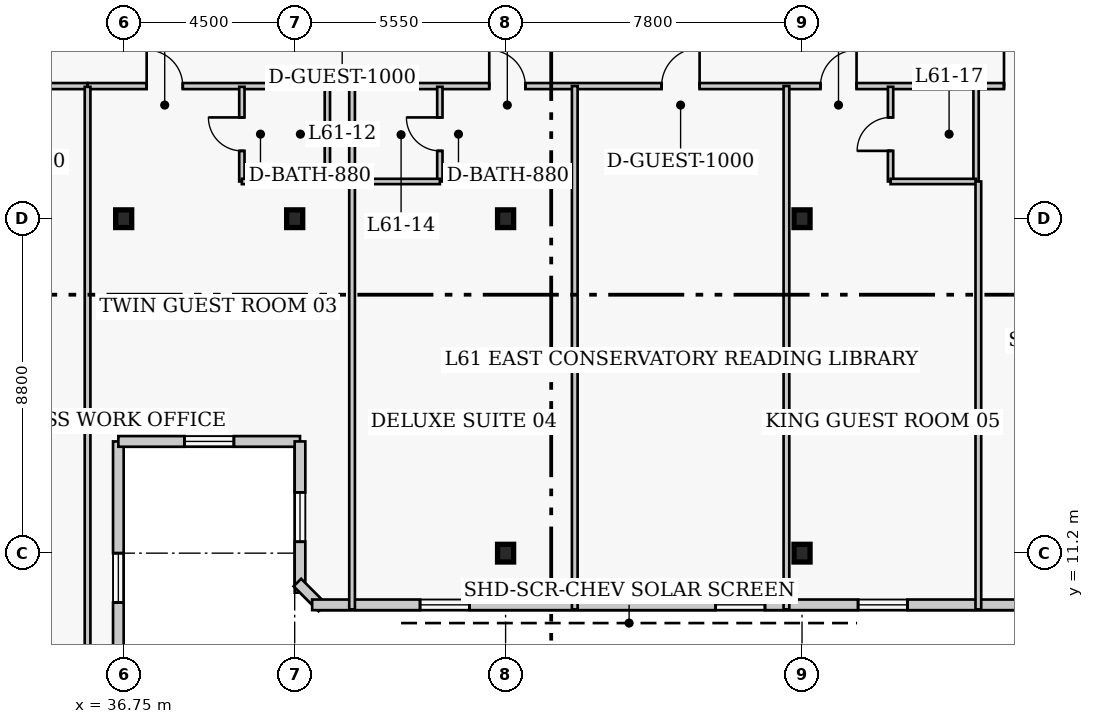
"""IFC4 building model, lengths in metres.
Left out: names, types, materials, properties, quantities, classifications, styles, units other than length and angle.
Written with IfcOpenShell. Run it as: python <this file> out.ifc"""

import sys

from ifc_helpers import new_model, si_unit, direction, frame, frame_2d, origin, origin_2d, place, context, subcontext, project, spatial, rectangle, i_section, extrude, element, fill, save


model = new_model("IFC4")
c1 = context("Model", 3, precision=1e-05, world=origin(), true_north=direction((0.0, 1.0)))
c2 = subcontext(c1, "Body", "Model", "MODEL_VIEW")
j1 = project(units=[si_unit("LENGTHUNIT", "METRE"), si_unit("PLANEANGLEUNIT", "RADIAN")], contexts=[c1])
p1 = place(None, origin())
s1 = spatial("IfcSite", under=j1, at=p1, CompositionType="ELEMENT")
p2 = place(p1, origin())
s2 = spatial("IfcBuilding", under=s1, at=p2, CompositionType="ELEMENT")
p3 = place(p2, frame((0.0, 0.0, 245.4)))
s3 = spatial("IfcBuildingStorey", under=s2, at=p3, CompositionType="ELEMENT", Elevation=245.4)
for number, where, z_axis, x_axis in (
    (1, (36.75, 20.0, 0.0), (0.0, 0.0, 1.0), (1.0, 0.0, 0.0)),
    (2, (41.25, 20.0, 0.0), (0.0, 0.0, 1.0), (1.0, 0.0, 0.0)),
    (3, (46.8, 11.2, 0.0), (0.0, 0.0, 1.0), (1.0, 0.0, 0.0)),
    (4, (46.8, 20.0, 0.0), (0.0, 0.0, 1.0), (1.0, 0.0, 0.0)),
    (5, (54.6, 11.2, 0.0), (0.0, 0.0, 1.0), (1.0, 0.0, 0.0)),
    (6, (54.6, 20.0, 0.0), (0.0, 0.0, 1.0), (1.0, 0.0, 0.0)),
):
    element("IfcColumn", number, at=place(p3, frame(where, z_axis=z_axis, x_axis=x_axis)), inside=s3, PredefinedType="COLUMN", context=c2, shape_type="SweptSolid", body=[
        extrude(i_section(OverallWidth=0.422, OverallDepth=0.465, WebThickness=0.045, FlangeThickness=0.073, FilletRadius=0.017, at=origin_2d()), origin(), (0.0, 0.0, 1.0), 4.0),
    ])
p4 = place(p3, frame((36.61, 6.96, 0.0), z_axis=(0.0, 0.0, 1.0), x_axis=(0.0, 1.0, 0.0)))
e7 = element("IfcWall", 7, at=p4, inside=s3, PredefinedType="SOLIDWALL", context=c2, shape_type="SweptSolid", body=[
    extrude(rectangle(XDim=7.18, YDim=0.28, at=frame_2d((3.59, 0.0))), origin(), (0.0, 0.0, 1.0), 3.76),
])
p5 = place(p4, frame((2.94, 0.0, 0.85)))
e8 = element("IfcOpeningElement", 8, at=p5, cuts=e7, PredefinedType="OPENING", context=c2, shape_type="SweptSolid", body=[
    extrude(rectangle(XDim=1.3, YDim=1.7, at=frame_2d((0.65, 0.85))), frame((0.0, 0.15, 0.0), z_axis=(0.0, -1.0, 0.0), x_axis=(1.0, 0.0, 0.0)), (0.0, 0.0, 1.0), 0.3),
])
p6 = place(p3, frame((36.61, 14.14, 0.0), z_axis=(0.0, 0.0, 1.0), x_axis=(1.0, 0.0, 0.0)))
e9 = element("IfcWall", 9, at=p6, inside=s3, PredefinedType="SOLIDWALL", context=c2, shape_type="SweptSolid", body=[
    extrude(rectangle(XDim=4.78, YDim=0.28, at=frame_2d((2.39, 0.0))), origin(), (0.0, 0.0, 1.0), 3.76),
])
p7 = place(p6, frame((1.74, 0.0, 0.85)))
e10 = element("IfcOpeningElement", 10, at=p7, cuts=e9, PredefinedType="OPENING", context=c2, shape_type="SweptSolid", body=[
    extrude(rectangle(XDim=1.3, YDim=1.7, at=frame_2d((0.65, 0.85))), frame((0.0, 0.15, 0.0), z_axis=(0.0, -1.0, 0.0), x_axis=(1.0, 0.0, 0.0)), (0.0, 0.0, 1.0), 0.3),
])
p8 = place(p3, frame((41.39, 14.14, 0.0), z_axis=(0.0, 0.0, 1.0), x_axis=(0.0, -1.0, 0.0)))
e11 = element("IfcWall", 11, at=p8, inside=s3, PredefinedType="SOLIDWALL", context=c2, shape_type="SweptSolid", body=[
    extrude(rectangle(XDim=3.98, YDim=0.28, at=frame_2d((1.99, 0.0))), origin(), (0.0, 0.0, 1.0), 3.76),
])
p9 = place(p8, frame((1.34, 0.0, 0.85)))
e12 = element("IfcOpeningElement", 12, at=p9, cuts=e11, PredefinedType="OPENING", context=c2, shape_type="SweptSolid", body=[
    extrude(rectangle(XDim=1.3, YDim=1.7, at=frame_2d((0.65, 0.85))), frame((0.0, 0.15, 0.0), z_axis=(0.0, -1.0, 0.0), x_axis=(1.0, 0.0, 0.0)), (0.0, 0.0, 1.0), 0.3),
])
p10 = place(p3, frame((41.321, 10.427, 0.0), z_axis=(0.0, 0.0, 1.0), x_axis=(0.707106781187, -0.707106781187, 0.0)))
e13 = element("IfcWall", 13, at=p10, inside=s3, PredefinedType="SOLIDWALL", context=c2, shape_type="SweptSolid", body=[
    extrude(rectangle(XDim=0.928, YDim=0.28, at=frame_2d((0.464, 0.0))), origin(), (0.0, 0.0, 1.0), 3.76),
])
p11 = place(p3, frame((41.71, 9.84, 0.0), z_axis=(0.0, 0.0, 1.0), x_axis=(1.0, 0.0, 0.0)))
e14 = element("IfcWall", 14, at=p11, inside=s3, PredefinedType="SOLIDWALL", context=c2, shape_type="SweptSolid", body=[
    extrude(rectangle(XDim=24.83, YDim=0.28, at=frame_2d((12.415, 0.0))), origin(), (0.0, 0.0, 1.0), 3.76),
])
p12 = place(p11, frame((2.838, 0.0, 0.85)))
e15 = element("IfcOpeningElement", 15, at=p12, cuts=e14, PredefinedType="OPENING", context=c2, shape_type="SweptSolid", body=[
    extrude(rectangle(XDim=1.3, YDim=1.7, at=frame_2d((0.65, 0.85))), frame((0.0, 0.15, 0.0), z_axis=(0.0, -1.0, 0.0), x_axis=(1.0, 0.0, 0.0)), (0.0, 0.0, 1.0), 0.3),
])
p13 = place(p11, frame((10.615, 0.0, 0.85)))
e16 = element("IfcOpeningElement", 16, at=p13, cuts=e14, PredefinedType="OPENING", context=c2, shape_type="SweptSolid", body=[
    extrude(rectangle(XDim=1.3, YDim=1.7, at=frame_2d((0.65, 0.85))), frame((0.0, 0.15, 0.0), z_axis=(0.0, -1.0, 0.0), x_axis=(1.0, 0.0, 0.0)), (0.0, 0.0, 1.0), 0.3),
])
p14 = place(p11, frame((18.892, 0.0, 0.85)))
e17 = element("IfcOpeningElement", 17, at=p14, cuts=e14, PredefinedType="OPENING", context=c2, shape_type="SweptSolid", body=[
    extrude(rectangle(XDim=1.3, YDim=1.7, at=frame_2d((0.65, 0.85))), frame((0.0, 0.15, 0.0), z_axis=(0.0, -1.0, 0.0), x_axis=(1.0, 0.0, 0.0)), (0.0, 0.0, 1.0), 0.3),
])
p15 = place(p11, frame((14.365, 0.0, 0.85)))
e18 = element("IfcOpeningElement", 18, at=p15, cuts=e14, PredefinedType="OPENING", context=c2, shape_type="SweptSolid", body=[
    extrude(rectangle(XDim=1.3, YDim=1.7, at=frame_2d((0.65, 0.85))), frame((0.0, 0.15, 0.0), z_axis=(0.0, -1.0, 0.0), x_axis=(1.0, 0.0, 0.0)), (0.0, 0.0, 1.0), 0.3),
])
p16 = place(p3, frame((19.9, 23.49, 0.0), z_axis=(0.0, 0.0, 1.0), x_axis=(1.0, 0.0, 0.0)))
e19 = element("IfcWall", 19, at=p16, inside=s3, PredefinedType="PARTITIONING", context=c2, shape_type="SweptSolid", body=[
    extrude(rectangle(XDim=15.9, YDim=0.16, at=frame_2d((7.95, 0.0))), origin(), (0.0, 0.0, 1.0), 3.76),
])
p17 = place(p16, frame((3.61, 0.0, 0.0)))
e20 = element("IfcOpeningElement", 20, at=p17, cuts=e19, PredefinedType="OPENING", context=c2, shape_type="SweptSolid", body=[
    extrude(rectangle(XDim=0.95, YDim=2.1, at=frame_2d((0.475, 1.05))), frame((0.0, 0.09, 0.0), z_axis=(0.0, -1.0, 0.0), x_axis=(1.0, 0.0, 0.0)), (0.0, 0.0, 1.0), 0.18),
])
p18 = place(p16, frame((9.005, 0.0, 0.0)))
e21 = element("IfcOpeningElement", 21, at=p18, cuts=e19, PredefinedType="OPENING", context=c2, shape_type="SweptSolid", body=[
    extrude(rectangle(XDim=0.95, YDim=2.1, at=frame_2d((0.475, 1.05))), frame((0.0, 0.09, 0.0), z_axis=(0.0, -1.0, 0.0), x_axis=(1.0, 0.0, 0.0)), (0.0, 0.0, 1.0), 0.18),
])
p19 = place(p16, frame((12.875, 0.0, 0.0)))
e22 = element("IfcOpeningElement", 22, at=p19, cuts=e19, PredefinedType="OPENING", context=c2, shape_type="SweptSolid", body=[
    extrude(rectangle(XDim=1.0, YDim=2.15, at=frame_2d((0.5, 1.075))), frame((0.0, 0.09, 0.0), z_axis=(0.0, -1.0, 0.0), x_axis=(1.0, 0.0, 0.0)), (0.0, 0.0, 1.0), 0.18),
])
p20 = place(p3, frame((35.8, 23.49, 0.0), z_axis=(0.0, 0.0, 1.0), x_axis=(1.0, 0.0, 0.0)))
e23 = element("IfcWall", 23, at=p20, inside=s3, PredefinedType="PARTITIONING", context=c2, shape_type="SweptSolid", body=[
    extrude(rectangle(XDim=25.66, YDim=0.16, at=frame_2d((12.83, 0.0))), origin(), (0.0, 0.0, 1.0), 3.76),
])
p21 = place(p20, frame((1.555, 0.0, 0.0)))
e24 = element("IfcOpeningElement", 24, at=p21, cuts=e23, PredefinedType="OPENING", context=c2, shape_type="SweptSolid", body=[
    extrude(rectangle(XDim=0.95, YDim=2.1, at=frame_2d((0.475, 1.05))), frame((0.0, 0.09, 0.0), z_axis=(0.0, -1.0, 0.0), x_axis=(1.0, 0.0, 0.0)), (0.0, 0.0, 1.0), 0.18),
])
p22 = place(p20, frame((10.57, 0.0, 0.0)))
e25 = element("IfcOpeningElement", 25, at=p22, cuts=e23, PredefinedType="OPENING", context=c2, shape_type="SweptSolid", body=[
    extrude(rectangle(XDim=0.95, YDim=2.1, at=frame_2d((0.475, 1.05))), frame((0.0, 0.09, 0.0), z_axis=(0.0, -1.0, 0.0), x_axis=(1.0, 0.0, 0.0)), (0.0, 0.0, 1.0), 0.18),
])
p23 = place(p20, frame((15.105, 0.0, 0.0)))
e26 = element("IfcOpeningElement", 26, at=p23, cuts=e23, PredefinedType="OPENING", context=c2, shape_type="SweptSolid", body=[
    extrude(rectangle(XDim=1.0, YDim=2.15, at=frame_2d((0.5, 1.075))), frame((0.0, 0.09, 0.0), z_axis=(0.0, -1.0, 0.0), x_axis=(1.0, 0.0, 0.0)), (0.0, 0.0, 1.0), 0.18),
])
p24 = place(p20, frame((19.285, 0.0, 0.0)))
e27 = element("IfcOpeningElement", 27, at=p24, cuts=e23, PredefinedType="OPENING", context=c2, shape_type="SweptSolid", body=[
    extrude(rectangle(XDim=0.95, YDim=2.1, at=frame_2d((0.475, 1.05))), frame((0.0, 0.09, 0.0), z_axis=(0.0, -1.0, 0.0), x_axis=(1.0, 0.0, 0.0)), (0.0, 0.0, 1.0), 0.18),
])
p25 = place(p20, frame((24.115, 0.0, 0.0)))
e28 = element("IfcOpeningElement", 28, at=p25, cuts=e23, PredefinedType="OPENING", context=c2, shape_type="SweptSolid", body=[
    extrude(rectangle(XDim=0.95, YDim=2.1, at=frame_2d((0.475, 1.05))), frame((0.0, 0.09, 0.0), z_axis=(0.0, -1.0, 0.0), x_axis=(1.0, 0.0, 0.0)), (0.0, 0.0, 1.0), 0.18),
])
p26 = place(p3, frame((35.8, 6.52, 0.0), z_axis=(0.0, 0.0, 1.0), x_axis=(0.0, 1.0, 0.0)))
e29 = element("IfcWall", 29, at=p26, inside=s3, PredefinedType="PARTITIONING", context=c2, shape_type="SweptSolid", body=[
    extrude(rectangle(XDim=16.95, YDim=0.15, at=frame_2d((8.475, 0.0))), origin(), (0.0, 0.0, 1.0), 3.76),
])
p27 = place(p3, frame((39.86, 20.98, 0.0), z_axis=(0.0, 0.0, 1.0), x_axis=(0.0, 1.0, 0.0)))
e30 = element("IfcWall", 30, at=p27, inside=s3, PredefinedType="PLUMBINGWALL", context=c2, shape_type="SweptSolid", body=[
    extrude(rectangle(XDim=2.49, YDim=0.14, at=frame_2d((1.245, 0.0))), origin(), (0.0, 0.0, 1.0), 3.76),
])
p28 = place(p27, frame((0.805, 0.0, 0.0)))
e31 = element("IfcOpeningElement", 31, at=p28, cuts=e30, PredefinedType="OPENING", context=c2, shape_type="SweptSolid", body=[
    extrude(rectangle(XDim=0.88, YDim=2.05, at=frame_2d((0.44, 1.025))), frame((0.0, 0.08, 0.0), z_axis=(0.0, -1.0, 0.0), x_axis=(1.0, 0.0, 0.0)), (0.0, 0.0, 1.0), 0.16),
])
p29 = place(p3, frame((42.11, 20.98, 0.0), z_axis=(0.0, 0.0, 1.0), x_axis=(0.0, 1.0, 0.0)))
e32 = element("IfcWall", 32, at=p29, inside=s3, PredefinedType="PLUMBINGWALL", context=c2, shape_type="SweptSolid", body=[
    extrude(rectangle(XDim=2.49, YDim=0.14, at=frame_2d((1.245, 0.0))), origin(), (0.0, 0.0, 1.0), 3.76),
])
p30 = place(p3, frame((39.86, 20.98, 0.0), z_axis=(0.0, 0.0, 1.0), x_axis=(1.0, 0.0, 0.0)))
e33 = element("IfcWall", 33, at=p30, inside=s3, PredefinedType="PLUMBINGWALL", context=c2, shape_type="SweptSolid", body=[
    extrude(rectangle(XDim=2.25, YDim=0.14, at=frame_2d((1.125, 0.0))), origin(), (0.0, 0.0, 1.0), 3.76),
])
p31 = place(p3, frame((42.76, 9.72, 0.0), z_axis=(0.0, 0.0, 1.0), x_axis=(0.0, 1.0, 0.0)))
e34 = element("IfcWall", 34, at=p31, inside=s3, PredefinedType="PARTITIONING", context=c2, shape_type="SweptSolid", body=[
    extrude(rectangle(XDim=13.77, YDim=0.15, at=frame_2d((6.885, 0.0))), origin(), (0.0, 0.0, 1.0), 3.76),
])
p32 = place(p3, frame((45.07, 20.98, 0.0), z_axis=(0.0, 0.0, 1.0), x_axis=(0.0, 1.0, 0.0)))
e35 = element("IfcWall", 35, at=p32, inside=s3, PredefinedType="PLUMBINGWALL", context=c2, shape_type="SweptSolid", body=[
    extrude(rectangle(XDim=2.49, YDim=0.14, at=frame_2d((1.245, 0.0))), origin(), (0.0, 0.0, 1.0), 3.76),
])
p33 = place(p32, frame((0.805, 0.0, 0.0)))
e36 = element("IfcOpeningElement", 36, at=p33, cuts=e35, PredefinedType="OPENING", context=c2, shape_type="SweptSolid", body=[
    extrude(rectangle(XDim=0.88, YDim=2.05, at=frame_2d((0.44, 1.025))), frame((0.0, 0.08, 0.0), z_axis=(0.0, -1.0, 0.0), x_axis=(1.0, 0.0, 0.0)), (0.0, 0.0, 1.0), 0.16),
])
p34 = place(p3, frame((42.82, 20.98, 0.0), z_axis=(0.0, 0.0, 1.0), x_axis=(1.0, 0.0, 0.0)))
e37 = element("IfcWall", 37, at=p34, inside=s3, PredefinedType="PLUMBINGWALL", context=c2, shape_type="SweptSolid", body=[
    extrude(rectangle(XDim=2.25, YDim=0.14, at=frame_2d((1.125, 0.0))), origin(), (0.0, 0.0, 1.0), 3.76),
])
for number, where, z_axis, x_axis in (
    (38, (48.62, 9.72, 0.0), (0.0, 0.0, 1.0), (0.0, 1.0, 0.0)),
    (39, (54.19, 9.72, 0.0), (0.0, 0.0, 1.0), (0.0, 1.0, 0.0)),
):
    element("IfcWall", number, at=place(p3, frame(where, z_axis=z_axis, x_axis=x_axis)), inside=s3, PredefinedType="PARTITIONING", context=c2, shape_type="SweptSolid", body=[
        extrude(rectangle(XDim=13.77, YDim=0.15, at=frame_2d((6.885, 0.0))), origin(), (0.0, 0.0, 1.0), 3.76),
    ])
p35 = place(p3, frame((56.93, 20.98, 0.0), z_axis=(0.0, 0.0, 1.0), x_axis=(0.0, 1.0, 0.0)))
e40 = element("IfcWall", 40, at=p35, inside=s3, PredefinedType="PLUMBINGWALL", context=c2, shape_type="SweptSolid", body=[
    extrude(rectangle(XDim=2.49, YDim=0.14, at=frame_2d((1.245, 0.0))), origin(), (0.0, 0.0, 1.0), 3.76),
])
p36 = place(p35, frame((0.805, 0.0, 0.0)))
e41 = element("IfcOpeningElement", 41, at=p36, cuts=e40, PredefinedType="OPENING", context=c2, shape_type="SweptSolid", body=[
    extrude(rectangle(XDim=0.88, YDim=2.05, at=frame_2d((0.44, 1.025))), frame((0.0, 0.08, 0.0), z_axis=(0.0, -1.0, 0.0), x_axis=(1.0, 0.0, 0.0)), (0.0, 0.0, 1.0), 0.16),
])
p37 = place(p3, frame((59.18, 20.98, 0.0), z_axis=(0.0, 0.0, 1.0), x_axis=(0.0, 1.0, 0.0)))
e42 = element("IfcWall", 42, at=p37, inside=s3, PredefinedType="PLUMBINGWALL", context=c2, shape_type="SweptSolid", body=[
    extrude(rectangle(XDim=2.49, YDim=0.14, at=frame_2d((1.245, 0.0))), origin(), (0.0, 0.0, 1.0), 3.76),
])
p38 = place(p3, frame((56.93, 20.98, 0.0), z_axis=(0.0, 0.0, 1.0), x_axis=(1.0, 0.0, 0.0)))
e43 = element("IfcWall", 43, at=p38, inside=s3, PredefinedType="PLUMBINGWALL", context=c2, shape_type="SweptSolid", body=[
    extrude(rectangle(XDim=2.25, YDim=0.14, at=frame_2d((1.125, 0.0))), origin(), (0.0, 0.0, 1.0), 3.76),
])
p39 = place(p3, frame((59.24, 9.72, 0.0), z_axis=(0.0, 0.0, 1.0), x_axis=(0.0, 1.0, 0.0)))
e44 = element("IfcWall", 44, at=p39, inside=s3, PredefinedType="PARTITIONING", context=c2, shape_type="SweptSolid", body=[
    extrude(rectangle(XDim=11.26, YDim=0.15, at=frame_2d((5.63, 0.0))), origin(), (0.0, 0.0, 1.0), 3.76),
])
p40 = place(p5, origin())
e45 = element("IfcWindow", 45, at=p40, inside=s3, PartitioningType="SINGLE_PANEL", PredefinedType="WINDOW", context=c2, shape_type="SweptSolid", body=[
    extrude(rectangle(XDim=1.3, YDim=1.7, at=frame_2d((0.65, 0.85))), frame((0.0, 0.03, 0.0), z_axis=(0.0, -1.0, 0.0), x_axis=(1.0, 0.0, 0.0)), (0.0, 0.0, 1.0), 0.06),
])
fill(e8, e45)
p41 = place(p7, origin())
e46 = element("IfcWindow", 46, at=p41, inside=s3, PartitioningType="SINGLE_PANEL", PredefinedType="WINDOW", context=c2, shape_type="SweptSolid", body=[
    extrude(rectangle(XDim=1.3, YDim=1.7, at=frame_2d((0.65, 0.85))), frame((0.0, 0.03, 0.0), z_axis=(0.0, -1.0, 0.0), x_axis=(1.0, 0.0, 0.0)), (0.0, 0.0, 1.0), 0.06),
])
fill(e10, e46)
p42 = place(p9, origin())
e47 = element("IfcWindow", 47, at=p42, inside=s3, PartitioningType="SINGLE_PANEL", PredefinedType="WINDOW", context=c2, shape_type="SweptSolid", body=[
    extrude(rectangle(XDim=1.3, YDim=1.7, at=frame_2d((0.65, 0.85))), frame((0.0, 0.03, 0.0), z_axis=(0.0, -1.0, 0.0), x_axis=(1.0, 0.0, 0.0)), (0.0, 0.0, 1.0), 0.06),
])
fill(e12, e47)
p43 = place(p12, origin())
e48 = element("IfcWindow", 48, at=p43, inside=s3, PartitioningType="SINGLE_PANEL", PredefinedType="WINDOW", context=c2, shape_type="SweptSolid", body=[
    extrude(rectangle(XDim=1.3, YDim=1.7, at=frame_2d((0.65, 0.85))), frame((0.0, 0.03, 0.0), z_axis=(0.0, -1.0, 0.0), x_axis=(1.0, 0.0, 0.0)), (0.0, 0.0, 1.0), 0.06),
])
fill(e15, e48)
p44 = place(p13, origin())
e49 = element("IfcWindow", 49, at=p44, inside=s3, PartitioningType="SINGLE_PANEL", PredefinedType="WINDOW", context=c2, shape_type="SweptSolid", body=[
    extrude(rectangle(XDim=1.3, YDim=1.7, at=frame_2d((0.65, 0.85))), frame((0.0, 0.03, 0.0), z_axis=(0.0, -1.0, 0.0), x_axis=(1.0, 0.0, 0.0)), (0.0, 0.0, 1.0), 0.06),
])
fill(e16, e49)
p45 = place(p15, origin())
e50 = element("IfcWindow", 50, at=p45, inside=s3, PartitioningType="SINGLE_PANEL", PredefinedType="WINDOW", context=c2, shape_type="SweptSolid", body=[
    extrude(rectangle(XDim=1.3, YDim=1.7, at=frame_2d((0.65, 0.85))), frame((0.0, 0.03, 0.0), z_axis=(0.0, -1.0, 0.0), x_axis=(1.0, 0.0, 0.0)), (0.0, 0.0, 1.0), 0.06),
])
fill(e18, e50)
p46 = place(p28, origin())
e51 = element("IfcDoor", 51, at=p46, inside=s3, OperationType="SINGLE_SWING_RIGHT", PredefinedType="DOOR", context=c2, shape_type="SweptSolid", body=[
    extrude(rectangle(XDim=0.88, YDim=2.05, at=frame_2d((0.44, 1.025))), frame((0.0, 0.025, 0.0), z_axis=(0.0, -1.0, 0.0), x_axis=(1.0, 0.0, 0.0)), (0.0, 0.0, 1.0), 0.05),
])
fill(e31, e51)
p47 = place(p21, origin())
e52 = element("IfcDoor", 52, at=p47, inside=s3, OperationType="SINGLE_SWING_LEFT", PredefinedType="DOOR", context=c2, shape_type="SweptSolid", body=[
    extrude(rectangle(XDim=0.95, YDim=2.1, at=frame_2d((0.475, 1.05))), frame((0.0, 0.025, 0.0), z_axis=(0.0, -1.0, 0.0), x_axis=(1.0, 0.0, 0.0)), (0.0, 0.0, 1.0), 0.05),
])
fill(e24, e52)
p48 = place(p33, origin())
e53 = element("IfcDoor", 53, at=p48, inside=s3, OperationType="SINGLE_SWING_RIGHT", PredefinedType="DOOR", context=c2, shape_type="SweptSolid", body=[
    extrude(rectangle(XDim=0.88, YDim=2.05, at=frame_2d((0.44, 1.025))), frame((0.0, 0.025, 0.0), z_axis=(0.0, -1.0, 0.0), x_axis=(1.0, 0.0, 0.0)), (0.0, 0.0, 1.0), 0.05),
])
fill(e36, e53)
p49 = place(p22, origin())
e54 = element("IfcDoor", 54, at=p49, inside=s3, OperationType="SINGLE_SWING_LEFT", PredefinedType="DOOR", context=c2, shape_type="SweptSolid", body=[
    extrude(rectangle(XDim=0.95, YDim=2.1, at=frame_2d((0.475, 1.05))), frame((0.0, 0.025, 0.0), z_axis=(0.0, -1.0, 0.0), x_axis=(1.0, 0.0, 0.0)), (0.0, 0.0, 1.0), 0.05),
])
fill(e25, e54)
p50 = place(p23, origin())
e55 = element("IfcDoor", 55, at=p50, inside=s3, OperationType="SINGLE_SWING_RIGHT", PredefinedType="DOOR", context=c2, shape_type="SweptSolid", body=[
    extrude(rectangle(XDim=1.0, YDim=2.15, at=frame_2d((0.5, 1.075))), frame((0.0, 0.025, 0.0), z_axis=(0.0, -1.0, 0.0), x_axis=(1.0, 0.0, 0.0)), (0.0, 0.0, 1.0), 0.05),
])
fill(e26, e55)
p51 = place(p36, origin())
e56 = element("IfcDoor", 56, at=p51, inside=s3, OperationType="SINGLE_SWING_LEFT", PredefinedType="DOOR", context=c2, shape_type="SweptSolid", body=[
    extrude(rectangle(XDim=0.88, YDim=2.05, at=frame_2d((0.44, 1.025))), frame((0.0, 0.025, 0.0), z_axis=(0.0, -1.0, 0.0), x_axis=(1.0, 0.0, 0.0)), (0.0, 0.0, 1.0), 0.05),
])
fill(e41, e56)
p52 = place(p24, origin())
e57 = element("IfcDoor", 57, at=p52, inside=s3, OperationType="SINGLE_SWING_RIGHT", PredefinedType="DOOR", context=c2, shape_type="SweptSolid", body=[
    extrude(rectangle(XDim=0.95, YDim=2.1, at=frame_2d((0.475, 1.05))), frame((0.0, 0.025, 0.0), z_axis=(0.0, -1.0, 0.0), x_axis=(1.0, 0.0, 0.0)), (0.0, 0.0, 1.0), 0.05),
])
fill(e27, e57)
p53 = place(p25, origin())
e58 = element("IfcDoor", 58, at=p53, inside=s3, OperationType="SINGLE_SWING_LEFT", PredefinedType="DOOR", context=c2, shape_type="SweptSolid", body=[
    extrude(rectangle(XDim=0.95, YDim=2.1, at=frame_2d((0.475, 1.05))), frame((0.0, 0.025, 0.0), z_axis=(0.0, -1.0, 0.0), x_axis=(1.0, 0.0, 0.0)), (0.0, 0.0, 1.0), 0.05),
])
fill(e28, e58)
save(model, sys.argv[1])
